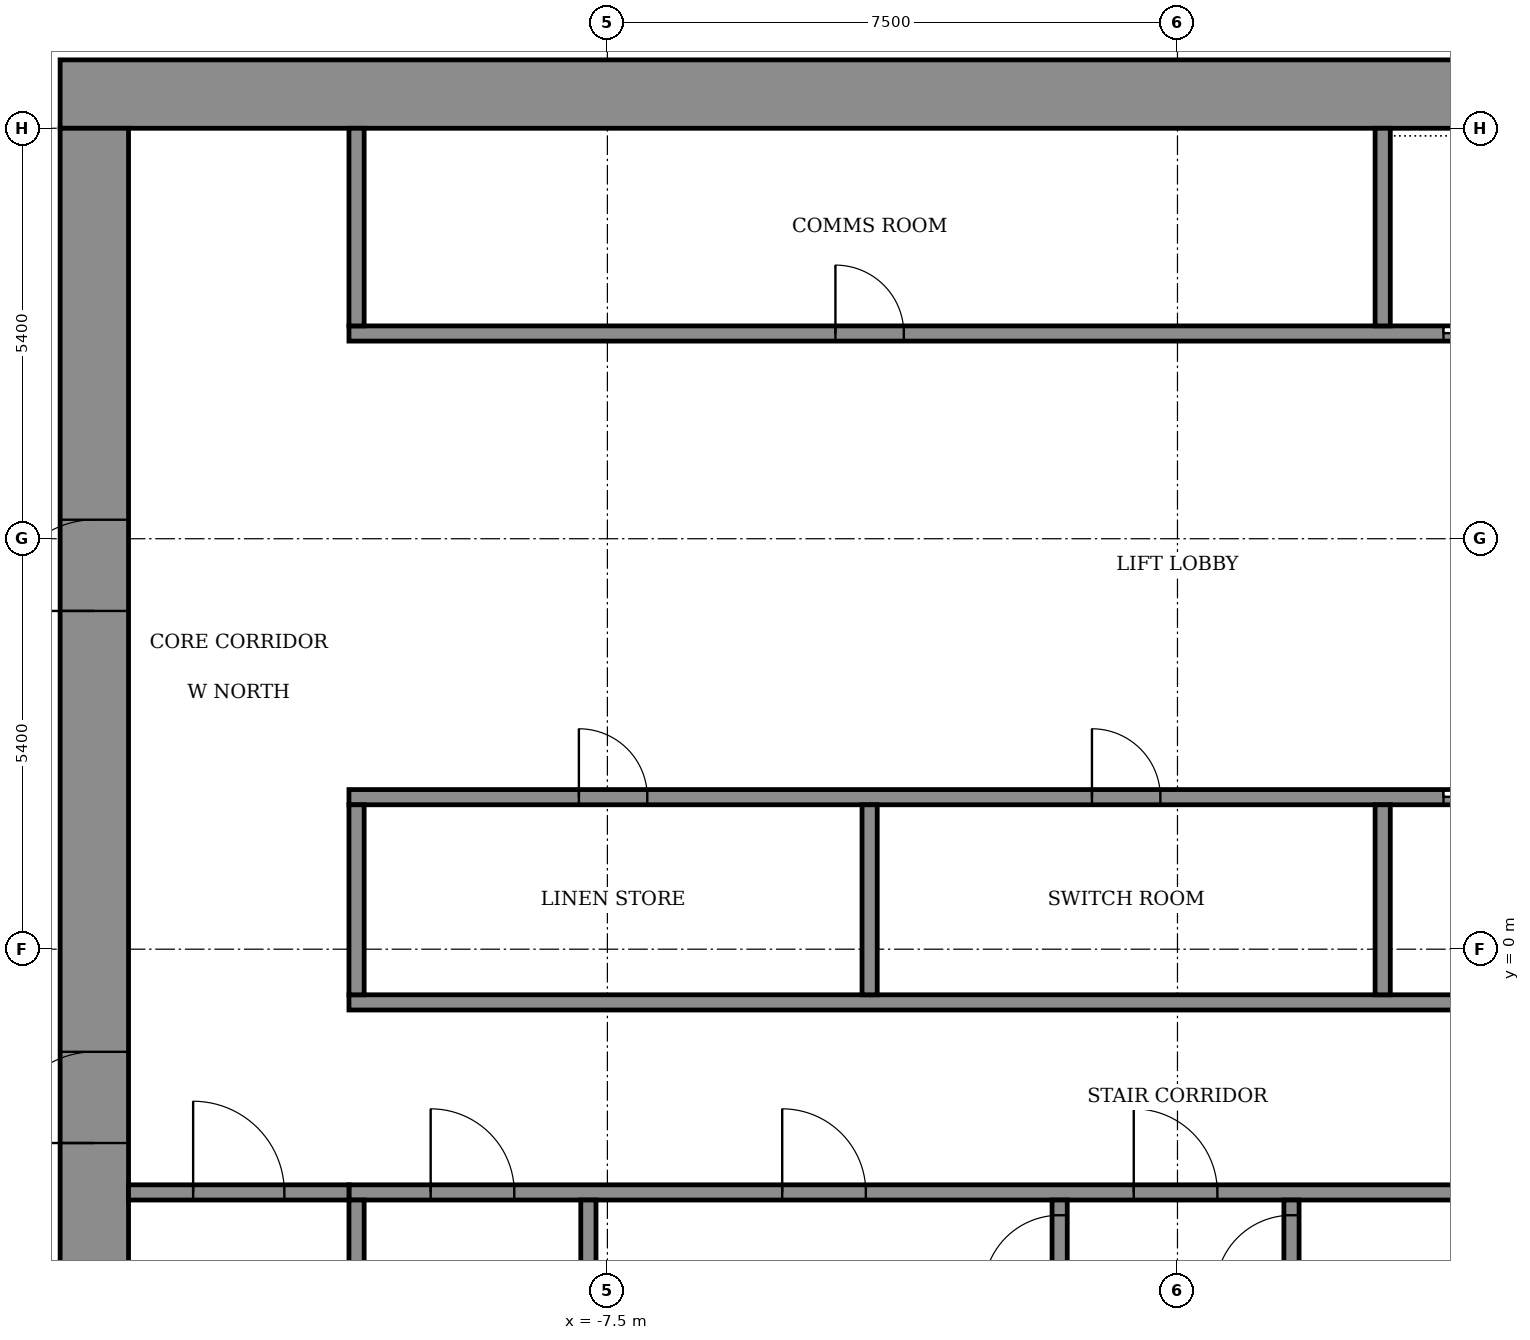
"""IFC4 building model, lengths in metres.
Left out: names, types, materials, properties, quantities, classifications, styles, units other than length and angle.
Written with IfcOpenShell. Run it as: python <this file> out.ifc"""

import sys

from ifc_helpers import new_model, si_unit, direction, frame, frame_2d, origin, place, context, subcontext, project, spatial, rectangle, extrude, element, fill, save


model = new_model("IFC4")
c1 = context("Model", 3, precision=1e-05, world=origin(), true_north=direction((0.0, 1.0)))
c2 = subcontext(c1, "Body", "Model", "MODEL_VIEW")
j1 = project(units=[si_unit("LENGTHUNIT", "METRE"), si_unit("PLANEANGLEUNIT", "RADIAN")], contexts=[c1])
p1 = place(None, origin())
s1 = spatial("IfcSite", under=j1, at=p1, CompositionType="ELEMENT")
p2 = place(p1, origin())
s2 = spatial("IfcBuilding", under=s1, at=p2, CompositionType="ELEMENT")
p3 = place(p2, frame((0.0, 0.0, 189.7)))
s3 = spatial("IfcBuildingStorey", under=s2, at=p3, CompositionType="ELEMENT", Elevation=189.7)
p4 = place(p3, frame((-14.7, 11.25, 0.0), z_axis=(0.0, 0.0, 1.0), x_axis=(1.0, 0.0, 0.0)))
e1 = element("IfcWall", 1, at=p4, inside=s3, PredefinedType="SHEAR", context=c2, shape_type="SweptSolid", body=[
    extrude(rectangle(XDim=29.4, YDim=0.9, at=frame_2d((14.7, 0.0))), origin(), (0.0, 0.0, 1.0), 3.6),
])
p5 = place(p3, frame((-14.25, -10.8, 0.0), z_axis=(0.0, 0.0, 1.0), x_axis=(0.0, 1.0, 0.0)))
e2 = element("IfcWall", 2, at=p5, inside=s3, PredefinedType="SHEAR", context=c2, shape_type="SweptSolid", body=[
    extrude(rectangle(XDim=21.6, YDim=0.9, at=frame_2d((10.8, 0.0))), origin(), (0.0, 0.0, 1.0), 3.6),
])
p6 = place(p5, frame((8.25, 0.0, 0.0)))
e3 = element("IfcOpeningElement", 3, at=p6, cuts=e2, PredefinedType="OPENING", context=c2, shape_type="SweptSolid", body=[
    extrude(rectangle(XDim=1.2, YDim=2.1, at=frame_2d((0.6, 1.05))), frame((0.0, 0.46, 0.0), z_axis=(0.0, -1.0, 0.0), x_axis=(1.0, 0.0, 0.0)), (0.0, 0.0, 1.0), 0.92),
])
p7 = place(p5, frame((15.25, 0.0, 0.0)))
e4 = element("IfcOpeningElement", 4, at=p7, cuts=e2, PredefinedType="OPENING", context=c2, shape_type="SweptSolid", body=[
    extrude(rectangle(XDim=1.2, YDim=2.1, at=frame_2d((0.6, 1.05))), frame((0.0, 0.46, 0.0), z_axis=(0.0, -1.0, 0.0), x_axis=(1.0, 0.0, 0.0)), (0.0, 0.0, 1.0), 0.92),
])
p8 = place(p3, frame((-10.9, -3.2, 0.0), z_axis=(0.0, 0.0, 1.0), x_axis=(1.0, 0.0, 0.0)))
e5 = element("IfcWall", 5, at=p8, inside=s3, PredefinedType="SHEAR", context=c2, shape_type="SweptSolid", body=[
    extrude(rectangle(XDim=21.8, YDim=0.2, at=frame_2d((10.9, 0.0))), origin(), (0.0, 0.0, 1.0), 3.05),
])
p9 = place(p8, frame((1.075, 0.0, 0.0)))
e6 = element("IfcOpeningElement", 6, at=p9, cuts=e5, PredefinedType="OPENING", context=c2, shape_type="SweptSolid", body=[
    extrude(rectangle(XDim=1.1, YDim=2.1, at=frame_2d((0.55, 1.05))), frame((0.0, 0.11, 0.0), z_axis=(0.0, -1.0, 0.0), x_axis=(1.0, 0.0, 0.0)), (0.0, 0.0, 1.0), 0.22),
])
p10 = place(p8, frame((10.325, 0.0, 0.0)))
e7 = element("IfcOpeningElement", 7, at=p10, cuts=e5, PredefinedType="OPENING", context=c2, shape_type="SweptSolid", body=[
    extrude(rectangle(XDim=1.1, YDim=2.1, at=frame_2d((0.55, 1.05))), frame((0.0, 0.11, 0.0), z_axis=(0.0, -1.0, 0.0), x_axis=(1.0, 0.0, 0.0)), (0.0, 0.0, 1.0), 0.22),
])
p11 = place(p8, frame((19.625, 0.0, 0.0)))
e8 = element("IfcOpeningElement", 8, at=p11, cuts=e5, PredefinedType="OPENING", context=c2, shape_type="SweptSolid", body=[
    extrude(rectangle(XDim=1.1, YDim=2.1, at=frame_2d((0.55, 1.05))), frame((0.0, 0.11, 0.0), z_axis=(0.0, -1.0, 0.0), x_axis=(1.0, 0.0, 0.0)), (0.0, 0.0, 1.0), 0.22),
])
p12 = place(p8, frame((5.7, 0.0, 0.0)))
e9 = element("IfcOpeningElement", 9, at=p12, cuts=e5, PredefinedType="OPENING", context=c2, shape_type="SweptSolid", body=[
    extrude(rectangle(XDim=1.1, YDim=2.1, at=frame_2d((0.55, 1.05))), frame((0.0, 0.11, 0.0), z_axis=(0.0, -1.0, 0.0), x_axis=(1.0, 0.0, 0.0)), (0.0, 0.0, 1.0), 0.22),
])
p13 = place(p8, frame((14.975, 0.0, 0.0)))
e10 = element("IfcOpeningElement", 10, at=p13, cuts=e5, PredefinedType="OPENING", context=c2, shape_type="SweptSolid", body=[
    extrude(rectangle(XDim=1.1, YDim=2.1, at=frame_2d((0.55, 1.05))), frame((0.0, 0.11, 0.0), z_axis=(0.0, -1.0, 0.0), x_axis=(1.0, 0.0, 0.0)), (0.0, 0.0, 1.0), 0.22),
])
p14 = place(p3, frame((-10.9, -0.7, 0.0), z_axis=(0.0, 0.0, 1.0), x_axis=(1.0, 0.0, 0.0)))
e11 = element("IfcWall", 11, at=p14, inside=s3, PredefinedType="SHEAR", context=c2, shape_type="SweptSolid", body=[
    extrude(rectangle(XDim=21.8, YDim=0.2, at=frame_2d((10.9, 0.0))), origin(), (0.0, 0.0, 1.0), 3.05),
])
p15 = place(p3, frame((-10.9, 2.0, 0.0), z_axis=(0.0, 0.0, 1.0), x_axis=(1.0, 0.0, 0.0)))
e12 = element("IfcWall", 12, at=p15, inside=s3, PredefinedType="SHEAR", context=c2, shape_type="SweptSolid", body=[
    extrude(rectangle(XDim=21.8, YDim=0.2, at=frame_2d((10.9, 0.0))), origin(), (0.0, 0.0, 1.0), 3.05),
])
p16 = place(p15, frame((14.4, 0.0, 0.0)))
e13 = element("IfcOpeningElement", 13, at=p16, cuts=e12, PredefinedType="OPENING", context=c2, shape_type="SweptSolid", body=[
    extrude(rectangle(XDim=1.1, YDim=2.1, at=frame_2d((0.55, 1.05))), frame((0.0, 0.11, 0.0), z_axis=(0.0, -1.0, 0.0), x_axis=(1.0, 0.0, 0.0)), (0.0, 0.0, 1.0), 0.22),
])
p17 = place(p15, frame((17.1, 0.0, 0.0)))
e14 = element("IfcOpeningElement", 14, at=p17, cuts=e12, PredefinedType="OPENING", context=c2, shape_type="SweptSolid", body=[
    extrude(rectangle(XDim=1.1, YDim=2.1, at=frame_2d((0.55, 1.05))), frame((0.0, 0.11, 0.0), z_axis=(0.0, -1.0, 0.0), x_axis=(1.0, 0.0, 0.0)), (0.0, 0.0, 1.0), 0.22),
])
p18 = place(p15, frame((19.8, 0.0, 0.0)))
e15 = element("IfcOpeningElement", 15, at=p18, cuts=e12, PredefinedType="OPENING", context=c2, shape_type="SweptSolid", body=[
    extrude(rectangle(XDim=1.1, YDim=2.1, at=frame_2d((0.55, 1.05))), frame((0.0, 0.11, 0.0), z_axis=(0.0, -1.0, 0.0), x_axis=(1.0, 0.0, 0.0)), (0.0, 0.0, 1.0), 0.22),
])
p19 = place(p15, frame((3.025, 0.0, 0.0)))
e16 = element("IfcOpeningElement", 16, at=p19, cuts=e12, PredefinedType="OPENING", context=c2, shape_type="SweptSolid", body=[
    extrude(rectangle(XDim=0.9, YDim=2.1, at=frame_2d((0.45, 1.05))), frame((0.0, 0.11, 0.0), z_axis=(0.0, -1.0, 0.0), x_axis=(1.0, 0.0, 0.0)), (0.0, 0.0, 1.0), 0.22),
])
p20 = place(p15, frame((9.775, 0.0, 0.0)))
e17 = element("IfcOpeningElement", 17, at=p20, cuts=e12, PredefinedType="OPENING", context=c2, shape_type="SweptSolid", body=[
    extrude(rectangle(XDim=0.9, YDim=2.1, at=frame_2d((0.45, 1.05))), frame((0.0, 0.11, 0.0), z_axis=(0.0, -1.0, 0.0), x_axis=(1.0, 0.0, 0.0)), (0.0, 0.0, 1.0), 0.22),
])
p21 = place(p3, frame((-10.9, 8.1, 0.0), z_axis=(0.0, 0.0, 1.0), x_axis=(1.0, 0.0, 0.0)))
e18 = element("IfcWall", 18, at=p21, inside=s3, PredefinedType="SHEAR", context=c2, shape_type="SweptSolid", body=[
    extrude(rectangle(XDim=21.8, YDim=0.2, at=frame_2d((10.9, 0.0))), origin(), (0.0, 0.0, 1.0), 3.05),
])
p22 = place(p21, frame((14.4, 0.0, 0.0)))
e19 = element("IfcOpeningElement", 19, at=p22, cuts=e18, PredefinedType="OPENING", context=c2, shape_type="SweptSolid", body=[
    extrude(rectangle(XDim=1.1, YDim=2.1, at=frame_2d((0.55, 1.05))), frame((0.0, 0.11, 0.0), z_axis=(0.0, -1.0, 0.0), x_axis=(1.0, 0.0, 0.0)), (0.0, 0.0, 1.0), 0.22),
])
p23 = place(p21, frame((17.1, 0.0, 0.0)))
e20 = element("IfcOpeningElement", 20, at=p23, cuts=e18, PredefinedType="OPENING", context=c2, shape_type="SweptSolid", body=[
    extrude(rectangle(XDim=1.1, YDim=2.1, at=frame_2d((0.55, 1.05))), frame((0.0, 0.11, 0.0), z_axis=(0.0, -1.0, 0.0), x_axis=(1.0, 0.0, 0.0)), (0.0, 0.0, 1.0), 0.22),
])
p24 = place(p21, frame((19.8, 0.0, 0.0)))
e21 = element("IfcOpeningElement", 21, at=p24, cuts=e18, PredefinedType="OPENING", context=c2, shape_type="SweptSolid", body=[
    extrude(rectangle(XDim=1.1, YDim=2.1, at=frame_2d((0.55, 1.05))), frame((0.0, 0.11, 0.0), z_axis=(0.0, -1.0, 0.0), x_axis=(1.0, 0.0, 0.0)), (0.0, 0.0, 1.0), 0.22),
])
p25 = place(p21, frame((6.4, 0.0, 0.0)))
e22 = element("IfcOpeningElement", 22, at=p25, cuts=e18, PredefinedType="OPENING", context=c2, shape_type="SweptSolid", body=[
    extrude(rectangle(XDim=0.9, YDim=2.1, at=frame_2d((0.45, 1.05))), frame((0.0, 0.11, 0.0), z_axis=(0.0, -1.0, 0.0), x_axis=(1.0, 0.0, 0.0)), (0.0, 0.0, 1.0), 0.22),
])
for number, where, z_axis, x_axis in (
    (23, (-10.8, -10.8, 0.0), (0.0, 0.0, 1.0), (0.0, 1.0, 0.0)),
    (24, (-7.75, -10.8, 0.0), (0.0, 0.0, 1.0), (0.0, 1.0, 0.0)),
):
    element("IfcWall", number, at=place(p3, frame(where, z_axis=z_axis, x_axis=x_axis)), inside=s3, PredefinedType="SHEAR", context=c2, shape_type="SweptSolid", body=[
        extrude(rectangle(XDim=7.5, YDim=0.2, at=frame_2d((3.75, 0.0))), origin(), (0.0, 0.0, 1.0), 3.05),
    ])
p26 = place(p3, frame((-1.55, -10.8, 0.0), z_axis=(0.0, 0.0, 1.0), x_axis=(0.0, 1.0, 0.0)))
e25 = element("IfcWall", 25, at=p26, inside=s3, PredefinedType="SHEAR", context=c2, shape_type="SweptSolid", body=[
    extrude(rectangle(XDim=7.5, YDim=0.2, at=frame_2d((3.75, 0.0))), origin(), (0.0, 0.0, 1.0), 3.05),
])
p27 = place(p26, frame((6.3, 0.0, 0.0)))
e26 = element("IfcOpeningElement", 26, at=p27, cuts=e25, PredefinedType="OPENING", context=c2, shape_type="SweptSolid", body=[
    extrude(rectangle(XDim=1.0, YDim=2.1, at=frame_2d((0.5, 1.05))), frame((0.0, 0.11, 0.0), z_axis=(0.0, -1.0, 0.0), x_axis=(1.0, 0.0, 0.0)), (0.0, 0.0, 1.0), 0.22),
])
p28 = place(p3, frame((1.5, -10.8, 0.0), z_axis=(0.0, 0.0, 1.0), x_axis=(0.0, 1.0, 0.0)))
e27 = element("IfcWall", 27, at=p28, inside=s3, PredefinedType="SHEAR", context=c2, shape_type="SweptSolid", body=[
    extrude(rectangle(XDim=7.5, YDim=0.2, at=frame_2d((3.75, 0.0))), origin(), (0.0, 0.0, 1.0), 3.05),
])
p29 = place(p28, frame((6.3, 0.0, 0.0)))
e28 = element("IfcOpeningElement", 28, at=p29, cuts=e27, PredefinedType="OPENING", context=c2, shape_type="SweptSolid", body=[
    extrude(rectangle(XDim=1.0, YDim=2.1, at=frame_2d((0.5, 1.05))), frame((0.0, 0.11, 0.0), z_axis=(0.0, -1.0, 0.0), x_axis=(1.0, 0.0, 0.0)), (0.0, 0.0, 1.0), 0.22),
])
for number, where, z_axis, x_axis in (
    (29, (-10.8, -0.6, 0.0), (0.0, 0.0, 1.0), (0.0, 1.0, 0.0)),
    (30, (-4.05, -0.6, 0.0), (0.0, 0.0, 1.0), (0.0, 1.0, 0.0)),
):
    element("IfcWall", number, at=place(p3, frame(where, z_axis=z_axis, x_axis=x_axis)), inside=s3, PredefinedType="STANDARD", context=c2, shape_type="SweptSolid", body=[
        extrude(rectangle(XDim=2.5, YDim=0.2, at=frame_2d((1.25, 0.0))), origin(), (0.0, 0.0, 1.0), 3.05),
    ])
p30 = place(p3, frame((2.7, -0.6, 0.0), z_axis=(0.0, 0.0, 1.0), x_axis=(0.0, 1.0, 0.0)))
e31 = element("IfcWall", 31, at=p30, inside=s3, PredefinedType="SHEAR", context=c2, shape_type="SweptSolid", body=[
    extrude(rectangle(XDim=2.5, YDim=0.2, at=frame_2d((1.25, 0.0))), origin(), (0.0, 0.0, 1.0), 3.05),
])
p31 = place(p3, frame((-10.8, 8.2, 0.0), z_axis=(0.0, 0.0, 1.0), x_axis=(0.0, 1.0, 0.0)))
e32 = element("IfcWall", 32, at=p31, inside=s3, PredefinedType="STANDARD", context=c2, shape_type="SweptSolid", body=[
    extrude(rectangle(XDim=2.6, YDim=0.2, at=frame_2d((1.3, 0.0))), origin(), (0.0, 0.0, 1.0), 3.05),
])
p32 = place(p3, frame((2.7, 8.2, 0.0), z_axis=(0.0, 0.0, 1.0), x_axis=(0.0, 1.0, 0.0)))
e33 = element("IfcWall", 33, at=p32, inside=s3, PredefinedType="SHEAR", context=c2, shape_type="SweptSolid", body=[
    extrude(rectangle(XDim=2.6, YDim=0.2, at=frame_2d((1.3, 0.0))), origin(), (0.0, 0.0, 1.0), 3.05),
])
p33 = place(p3, frame((-13.8, -3.2, 0.0), z_axis=(0.0, 0.0, 1.0), x_axis=(1.0, 0.0, 0.0)))
e34 = element("IfcWall", 34, at=p33, inside=s3, PredefinedType="STANDARD", context=c2, shape_type="SweptSolid", body=[
    extrude(rectangle(XDim=2.9, YDim=0.2, at=frame_2d((1.45, 0.0))), origin(), (0.0, 0.0, 1.0), 3.05),
])
p34 = place(p33, frame((0.85, 0.0, 0.0)))
e35 = element("IfcOpeningElement", 35, at=p34, cuts=e34, PredefinedType="OPENING", context=c2, shape_type="SweptSolid", body=[
    extrude(rectangle(XDim=1.2, YDim=2.1, at=frame_2d((0.6, 1.05))), frame((0.0, 0.11, 0.0), z_axis=(0.0, -1.0, 0.0), x_axis=(1.0, 0.0, 0.0)), (0.0, 0.0, 1.0), 0.22),
])
p35 = place(p6, origin())
e36 = element("IfcDoor", 36, at=p35, inside=s3, OperationType="DOUBLE_DOOR_SINGLE_SWING", PredefinedType="DOOR", context=c2, shape_type="SweptSolid", body=[
    extrude(rectangle(XDim=1.2, YDim=2.1, at=frame_2d((0.6, 1.05))), frame((0.0, 0.025, 0.0), z_axis=(0.0, -1.0, 0.0), x_axis=(1.0, 0.0, 0.0)), (0.0, 0.0, 1.0), 0.05),
])
fill(e3, e36)
p36 = place(p7, origin())
e37 = element("IfcDoor", 37, at=p36, inside=s3, OperationType="DOUBLE_DOOR_SINGLE_SWING", PredefinedType="DOOR", context=c2, shape_type="SweptSolid", body=[
    extrude(rectangle(XDim=1.2, YDim=2.1, at=frame_2d((0.6, 1.05))), frame((0.0, 0.025, 0.0), z_axis=(0.0, -1.0, 0.0), x_axis=(1.0, 0.0, 0.0)), (0.0, 0.0, 1.0), 0.05),
])
fill(e4, e37)
p37 = place(p16, origin())
e38 = element("IfcDoor", 38, at=p37, inside=s3, OperationType="SLIDING_TO_LEFT", PredefinedType="DOOR", context=c2, shape_type="SweptSolid", body=[
    extrude(rectangle(XDim=1.1, YDim=2.1, at=frame_2d((0.55, 1.05))), frame((0.0, 0.025, 0.0), z_axis=(0.0, -1.0, 0.0), x_axis=(1.0, 0.0, 0.0)), (0.0, 0.0, 1.0), 0.05),
])
fill(e13, e38)
p38 = place(p22, origin())
e39 = element("IfcDoor", 39, at=p38, inside=s3, OperationType="SLIDING_TO_LEFT", PredefinedType="DOOR", context=c2, shape_type="SweptSolid", body=[
    extrude(rectangle(XDim=1.1, YDim=2.1, at=frame_2d((0.55, 1.05))), frame((0.0, 0.025, 0.0), z_axis=(0.0, -1.0, 0.0), x_axis=(1.0, 0.0, 0.0)), (0.0, 0.0, 1.0), 0.05),
])
fill(e19, e39)
p39 = place(p19, origin())
e40 = element("IfcDoor", 40, at=p39, inside=s3, OperationType="SINGLE_SWING_RIGHT", PredefinedType="DOOR", context=c2, shape_type="SweptSolid", body=[
    extrude(rectangle(XDim=0.9, YDim=2.1, at=frame_2d((0.45, 1.05))), frame((0.0, 0.025, 0.0), z_axis=(0.0, -1.0, 0.0), x_axis=(1.0, 0.0, 0.0)), (0.0, 0.0, 1.0), 0.05),
])
fill(e16, e40)
p40 = place(p20, origin())
e41 = element("IfcDoor", 41, at=p40, inside=s3, OperationType="SINGLE_SWING_LEFT", PredefinedType="DOOR", context=c2, shape_type="SweptSolid", body=[
    extrude(rectangle(XDim=0.9, YDim=2.1, at=frame_2d((0.45, 1.05))), frame((0.0, 0.025, 0.0), z_axis=(0.0, -1.0, 0.0), x_axis=(1.0, 0.0, 0.0)), (0.0, 0.0, 1.0), 0.05),
])
fill(e17, e41)
p41 = place(p25, origin())
e42 = element("IfcDoor", 42, at=p41, inside=s3, OperationType="SINGLE_SWING_LEFT", PredefinedType="DOOR", context=c2, shape_type="SweptSolid", body=[
    extrude(rectangle(XDim=0.9, YDim=2.1, at=frame_2d((0.45, 1.05))), frame((0.0, 0.025, 0.0), z_axis=(0.0, -1.0, 0.0), x_axis=(1.0, 0.0, 0.0)), (0.0, 0.0, 1.0), 0.05),
])
fill(e22, e42)
p42 = place(p9, origin())
e43 = element("IfcDoor", 43, at=p42, inside=s3, OperationType="SINGLE_SWING_RIGHT", PredefinedType="DOOR", context=c2, shape_type="SweptSolid", body=[
    extrude(rectangle(XDim=1.1, YDim=2.1, at=frame_2d((0.55, 1.05))), frame((0.0, 0.025, 0.0), z_axis=(0.0, -1.0, 0.0), x_axis=(1.0, 0.0, 0.0)), (0.0, 0.0, 1.0), 0.05),
])
fill(e6, e43)
p43 = place(p10, origin())
e44 = element("IfcDoor", 44, at=p43, inside=s3, OperationType="SINGLE_SWING_RIGHT", PredefinedType="DOOR", context=c2, shape_type="SweptSolid", body=[
    extrude(rectangle(XDim=1.1, YDim=2.1, at=frame_2d((0.55, 1.05))), frame((0.0, 0.025, 0.0), z_axis=(0.0, -1.0, 0.0), x_axis=(1.0, 0.0, 0.0)), (0.0, 0.0, 1.0), 0.05),
])
fill(e7, e44)
p44 = place(p12, origin())
e45 = element("IfcDoor", 45, at=p44, inside=s3, OperationType="SINGLE_SWING_LEFT", PredefinedType="DOOR", context=c2, shape_type="SweptSolid", body=[
    extrude(rectangle(XDim=1.1, YDim=2.1, at=frame_2d((0.55, 1.05))), frame((0.0, 0.025, 0.0), z_axis=(0.0, -1.0, 0.0), x_axis=(1.0, 0.0, 0.0)), (0.0, 0.0, 1.0), 0.05),
])
fill(e9, e45)
p45 = place(p27, origin())
e46 = element("IfcDoor", 46, at=p45, inside=s3, OperationType="SINGLE_SWING_RIGHT", PredefinedType="DOOR", context=c2, shape_type="SweptSolid", body=[
    extrude(rectangle(XDim=1.0, YDim=2.1, at=frame_2d((0.5, 1.05))), frame((0.0, 0.025, 0.0), z_axis=(0.0, -1.0, 0.0), x_axis=(1.0, 0.0, 0.0)), (0.0, 0.0, 1.0), 0.05),
])
fill(e26, e46)
p46 = place(p29, origin())
e47 = element("IfcDoor", 47, at=p46, inside=s3, OperationType="SINGLE_SWING_RIGHT", PredefinedType="DOOR", context=c2, shape_type="SweptSolid", body=[
    extrude(rectangle(XDim=1.0, YDim=2.1, at=frame_2d((0.5, 1.05))), frame((0.0, 0.025, 0.0), z_axis=(0.0, -1.0, 0.0), x_axis=(1.0, 0.0, 0.0)), (0.0, 0.0, 1.0), 0.05),
])
fill(e28, e47)
p47 = place(p34, origin())
e48 = element("IfcDoor", 48, at=p47, inside=s3, OperationType="SINGLE_SWING_LEFT", PredefinedType="DOOR", context=c2, shape_type="SweptSolid", body=[
    extrude(rectangle(XDim=1.2, YDim=2.1, at=frame_2d((0.6, 1.05))), frame((0.0, 0.025, 0.0), z_axis=(0.0, -1.0, 0.0), x_axis=(1.0, 0.0, 0.0)), (0.0, 0.0, 1.0), 0.05),
])
fill(e35, e48)
save(model, sys.argv[1])
